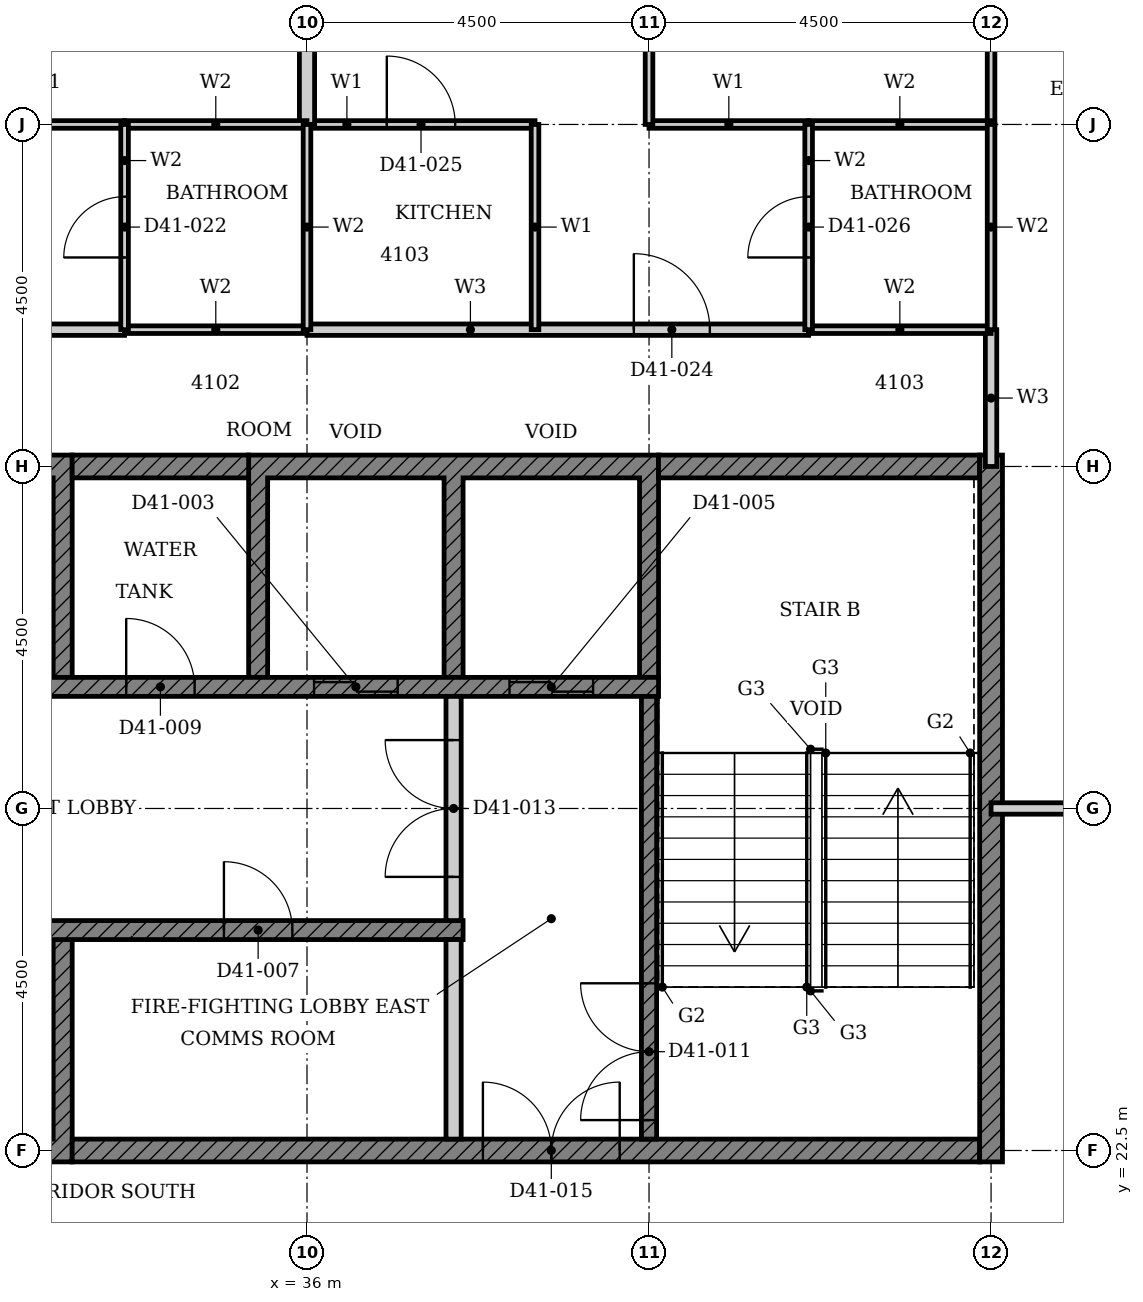
"""IFC4 building model, lengths in metres.
Left out: names, types, materials, properties, quantities, classifications, styles, units other than length and angle.
Written with IfcOpenShell. Run it as: python <this file> out.ifc"""

import sys

from ifc_helpers import new_model, si_unit, direction, frame, frame_2d, origin, place, context, subcontext, project, spatial, polyline, rectangle, outline, extrude, element, fill, save


model = new_model("IFC4")
c1 = context("Model", 3, precision=1e-05, world=origin(), true_north=direction((0.0, 1.0)))
c2 = subcontext(c1, "Body", "Model", "MODEL_VIEW")
j1 = project(units=[si_unit("LENGTHUNIT", "METRE"), si_unit("PLANEANGLEUNIT", "RADIAN")], contexts=[c1])
p1 = place(None, origin())
s1 = spatial("IfcSite", under=j1, at=p1, CompositionType="ELEMENT")
p2 = place(p1, origin())
s2 = spatial("IfcBuilding", under=s1, at=p2, CompositionType="ELEMENT")
p3 = place(p2, frame((0.0, 0.0, 165.4)))
s3 = spatial("IfcBuildingStorey", under=s2, at=p3, CompositionType="ELEMENT", Elevation=165.4)
p4 = place(p3, origin())
e1 = element("IfcWall", 1, at=p4, inside=s3, PredefinedType="SHEAR", context=c2, shape_type="SweptSolid", body=[
    extrude(outline(polyline([(27.518, 22.35), (32.911, 22.35), (32.911, 25.275), (32.661, 25.275), (32.661, 22.65), (30.339, 22.65), (30.339, 25.275), (30.089, 25.275), (30.089, 22.65), (27.768, 22.65), (27.768, 25.275), (27.518, 25.275), (27.518, 22.35)])), origin(), (0.0, 0.0, 1.0), 3.4),
])
p5 = place(p3, origin())
e2 = element("IfcWall", 2, at=p5, inside=s3, PredefinedType="SHEAR", context=c2, shape_type="SweptSolid", body=[
    extrude(outline(polyline([(27.518, 28.725), (27.768, 28.725), (27.768, 31.35), (30.089, 31.35), (30.089, 28.725), (30.339, 28.725), (30.339, 31.35), (32.661, 31.35), (32.661, 28.725), (32.911, 28.725), (32.911, 31.65), (27.518, 31.65), (27.518, 28.725)])), origin(), (0.0, 0.0, 1.0), 3.4),
])
p6 = place(p3, origin())
e3 = element("IfcWall", 3, at=p6, inside=s3, PredefinedType="SHEAR", context=c2, shape_type="SweptSolid", body=[
    extrude(outline(polyline([(35.232, 28.725), (35.482, 28.725), (35.482, 31.35), (37.803, 31.35), (37.803, 28.725), (38.053, 28.725), (38.053, 31.35), (40.375, 31.35), (40.375, 28.725), (40.625, 28.725), (40.625, 31.65), (35.232, 31.65), (35.232, 28.725)])), origin(), (0.0, 0.0, 1.0), 3.4),
])
p7 = place(p3, frame((32.911, 22.5, 0.0), z_axis=(0.0, 0.0, 1.0), x_axis=(1.0, 0.0, 0.0)))
e4 = element("IfcWall", 4, at=p7, inside=s3, PredefinedType="SHEAR", context=c2, shape_type="SweptSolid", body=[
    extrude(rectangle(XDim=11.939, YDim=0.3, at=frame_2d((5.97, 0.0))), origin(), (0.0, 0.0, 1.0), 3.4),
])
p8 = place(p7, frame((5.404, 0.0, 0.0)))
e5 = element("IfcOpeningElement", 5, at=p8, cuts=e4, PredefinedType="OPENING", context=c2, shape_type="SweptSolid", body=[
    extrude(rectangle(XDim=1.8, YDim=2.1, at=frame_2d((0.9, 1.05))), frame((0.0, 0.16, 0.0), z_axis=(0.0, -1.0, 0.0), x_axis=(1.0, 0.0, 0.0)), (0.0, 0.0, 1.0), 0.32),
])
p9 = place(p3, frame((32.911, 31.5, 0.0), z_axis=(0.0, 0.0, 1.0), x_axis=(1.0, 0.0, 0.0)))
e6 = element("IfcWall", 6, at=p9, inside=s3, PredefinedType="SHEAR", context=c2, shape_type="SweptSolid", body=[
    extrude(rectangle(XDim=2.322, YDim=0.3, at=frame_2d((1.161, 0.0))), origin(), (0.0, 0.0, 1.0), 3.4),
])
p10 = place(p3, frame((40.625, 31.5, 0.0), z_axis=(0.0, 0.0, 1.0), x_axis=(1.0, 0.0, 0.0)))
e7 = element("IfcWall", 7, at=p10, inside=s3, PredefinedType="SHEAR", context=c2, shape_type="SweptSolid", body=[
    extrude(rectangle(XDim=4.225, YDim=0.3, at=frame_2d((2.113, 0.0))), origin(), (0.0, 0.0, 1.0), 3.4),
])
p11 = place(p3, frame((45.0, 22.35, 0.0), z_axis=(0.0, 0.0, 1.0), x_axis=(0.0, 1.0, 0.0)))
e8 = element("IfcWall", 8, at=p11, inside=s3, PredefinedType="SHEAR", context=c2, shape_type="SweptSolid", body=[
    extrude(rectangle(XDim=9.3, YDim=0.3, at=frame_2d((4.65, 0.0))), origin(), (0.0, 0.0, 1.0), 3.4),
])
p12 = place(p3, frame((22.375, 25.4, 0.0), z_axis=(0.0, 0.0, 1.0), x_axis=(1.0, 0.0, 0.0)))
e9 = element("IfcWall", 9, at=p12, inside=s3, PredefinedType="SHEAR", context=c2, shape_type="SweptSolid", body=[
    extrude(rectangle(XDim=15.678, YDim=0.25, at=frame_2d((7.839, 0.0))), origin(), (0.0, 0.0, 1.0), 3.4),
])
p13 = place(p12, frame((8.575, 0.0, 0.0)))
e10 = element("IfcOpeningElement", 10, at=p13, cuts=e9, PredefinedType="OPENING", context=c2, shape_type="SweptSolid", body=[
    extrude(rectangle(XDim=1.1, YDim=2.1, at=frame_2d((0.55, 1.05))), frame((0.0, 0.135, 0.0), z_axis=(0.0, -1.0, 0.0), x_axis=(1.0, 0.0, 0.0)), (0.0, 0.0, 1.0), 0.27),
])
p14 = place(p12, frame((0.861, 0.0, 0.0)))
e11 = element("IfcOpeningElement", 11, at=p14, cuts=e9, PredefinedType="OPENING", context=c2, shape_type="SweptSolid", body=[
    extrude(rectangle(XDim=1.1, YDim=2.1, at=frame_2d((0.55, 1.05))), frame((0.0, 0.135, 0.0), z_axis=(0.0, -1.0, 0.0), x_axis=(1.0, 0.0, 0.0)), (0.0, 0.0, 1.0), 0.27),
])
p15 = place(p12, frame((3.532, 0.0, 0.0)))
e12 = element("IfcOpeningElement", 12, at=p15, cuts=e9, PredefinedType="OPENING", context=c2, shape_type="SweptSolid", body=[
    extrude(rectangle(XDim=0.9, YDim=2.1, at=frame_2d((0.45, 1.05))), frame((0.0, 0.135, 0.0), z_axis=(0.0, -1.0, 0.0), x_axis=(1.0, 0.0, 0.0)), (0.0, 0.0, 1.0), 0.27),
])
p16 = place(p12, frame((12.532, 0.0, 0.0)))
e13 = element("IfcOpeningElement", 13, at=p16, cuts=e9, PredefinedType="OPENING", context=c2, shape_type="SweptSolid", body=[
    extrude(rectangle(XDim=0.9, YDim=2.1, at=frame_2d((0.45, 1.05))), frame((0.0, 0.135, 0.0), z_axis=(0.0, -1.0, 0.0), x_axis=(1.0, 0.0, 0.0)), (0.0, 0.0, 1.0), 0.27),
])
p17 = place(p3, frame((24.947, 28.6, 0.0), z_axis=(0.0, 0.0, 1.0), x_axis=(1.0, 0.0, 0.0)))
e14 = element("IfcWall", 14, at=p17, inside=s3, PredefinedType="SHEAR", context=c2, shape_type="SweptSolid", body=[
    extrude(rectangle(XDim=15.678, YDim=0.25, at=frame_2d((7.839, 0.0))), origin(), (0.0, 0.0, 1.0), 3.4),
])
p18 = place(p17, frame((6.004, 0.0, 0.0)))
e15 = element("IfcOpeningElement", 15, at=p18, cuts=e14, PredefinedType="OPENING", context=c2, shape_type="SweptSolid", body=[
    extrude(rectangle(XDim=1.1, YDim=2.1, at=frame_2d((0.55, 1.05))), frame((0.0, 0.135, 0.0), z_axis=(0.0, -1.0, 0.0), x_axis=(1.0, 0.0, 0.0)), (0.0, 0.0, 1.0), 0.27),
])
p19 = place(p17, frame((11.146, 0.0, 0.0)))
e16 = element("IfcOpeningElement", 16, at=p19, cuts=e14, PredefinedType="OPENING", context=c2, shape_type="SweptSolid", body=[
    extrude(rectangle(XDim=1.1, YDim=2.1, at=frame_2d((0.55, 1.05))), frame((0.0, 0.135, 0.0), z_axis=(0.0, -1.0, 0.0), x_axis=(1.0, 0.0, 0.0)), (0.0, 0.0, 1.0), 0.27),
])
p20 = place(p17, frame((13.718, 0.0, 0.0)))
e17 = element("IfcOpeningElement", 17, at=p20, cuts=e14, PredefinedType="OPENING", context=c2, shape_type="SweptSolid", body=[
    extrude(rectangle(XDim=1.1, YDim=2.1, at=frame_2d((0.55, 1.05))), frame((0.0, 0.135, 0.0), z_axis=(0.0, -1.0, 0.0), x_axis=(1.0, 0.0, 0.0)), (0.0, 0.0, 1.0), 0.27),
])
p21 = place(p17, frame((0.961, 0.0, 0.0)))
e18 = element("IfcOpeningElement", 18, at=p21, cuts=e14, PredefinedType="OPENING", context=c2, shape_type="SweptSolid", body=[
    extrude(rectangle(XDim=0.9, YDim=2.1, at=frame_2d((0.45, 1.05))), frame((0.0, 0.135, 0.0), z_axis=(0.0, -1.0, 0.0), x_axis=(1.0, 0.0, 0.0)), (0.0, 0.0, 1.0), 0.27),
])
p22 = place(p17, frame((8.675, 0.0, 0.0)))
e19 = element("IfcOpeningElement", 19, at=p22, cuts=e14, PredefinedType="OPENING", context=c2, shape_type="SweptSolid", body=[
    extrude(rectangle(XDim=0.9, YDim=2.1, at=frame_2d((0.45, 1.05))), frame((0.0, 0.135, 0.0), z_axis=(0.0, -1.0, 0.0), x_axis=(1.0, 0.0, 0.0)), (0.0, 0.0, 1.0), 0.27),
])
p23 = place(p3, frame((37.928, 22.65, 0.0), z_axis=(0.0, 0.0, 1.0), x_axis=(0.0, 1.0, 0.0)))
e20 = element("IfcWall", 20, at=p23, inside=s3, PredefinedType="PARTITIONING", context=c2, shape_type="SweptSolid", body=[
    extrude(rectangle(XDim=2.625, YDim=0.2, at=frame_2d((1.312, 0.0))), origin(), (0.0, 0.0, 1.0), 3.4),
])
p24 = place(p3, frame((40.5, 22.65, 0.0), z_axis=(0.0, 0.0, 1.0), x_axis=(0.0, 1.0, 0.0)))
e21 = element("IfcWall", 21, at=p24, inside=s3, PredefinedType="SHEAR", context=c2, shape_type="SweptSolid", body=[
    extrude(rectangle(XDim=5.825, YDim=0.2, at=frame_2d((2.913, 0.0))), origin(), (0.0, 0.0, 1.0), 3.4),
])
p25 = place(p24, frame((0.25, 0.0, 0.0)))
e22 = element("IfcOpeningElement", 22, at=p25, cuts=e21, PredefinedType="OPENING", context=c2, shape_type="SweptSolid", body=[
    extrude(rectangle(XDim=1.8, YDim=2.1, at=frame_2d((0.9, 1.05))), frame((0.0, 0.11, 0.0), z_axis=(0.0, -1.0, 0.0), x_axis=(1.0, 0.0, 0.0)), (0.0, 0.0, 1.0), 0.22),
])
p26 = place(p3, frame((37.928, 25.525, 0.0), z_axis=(0.0, 0.0, 1.0), x_axis=(0.0, 1.0, 0.0)))
e23 = element("IfcWall", 23, at=p26, inside=s3, PredefinedType="PARTITIONING", context=c2, shape_type="SweptSolid", body=[
    extrude(rectangle(XDim=2.95, YDim=0.2, at=frame_2d((1.475, 0.0))), origin(), (0.0, 0.0, 1.0), 3.4),
])
p27 = place(p26, frame((0.575, 0.0, 0.0)))
e24 = element("IfcOpeningElement", 24, at=p27, cuts=e23, PredefinedType="OPENING", context=c2, shape_type="SweptSolid", body=[
    extrude(rectangle(XDim=1.8, YDim=2.1, at=frame_2d((0.9, 1.05))), frame((0.0, 0.11, 0.0), z_axis=(0.0, -1.0, 0.0), x_axis=(1.0, 0.0, 0.0)), (0.0, 0.0, 1.0), 0.22),
])
p28 = place(p3, frame((45.0, 27.0, 0.0), z_axis=(0.0, 0.0, 1.0), x_axis=(1.0, 0.0, 0.0)))
e25 = element("IfcWall", 25, at=p28, inside=s3, PredefinedType="PARTITIONING", context=c2, shape_type="SweptSolid", body=[
    extrude(rectangle(XDim=13.5, YDim=0.15, at=frame_2d((6.75, 0.0))), origin(), (0.0, 0.0, 1.0), 2.68),
])
p29 = place(p28, frame((7.15, 0.0, 0.0)))
e26 = element("IfcOpeningElement", 26, at=p29, cuts=e25, PredefinedType="OPENING", context=c2, shape_type="SweptSolid", body=[
    extrude(rectangle(XDim=1.0, YDim=2.1, at=frame_2d((0.5, 1.05))), frame((0.0, 0.085, 0.0), z_axis=(0.0, -1.0, 0.0), x_axis=(1.0, 0.0, 0.0)), (0.0, 0.0, 1.0), 0.17),
])
p30 = place(p3, frame((27.0, 33.3, 0.0), z_axis=(0.0, 0.0, 1.0), x_axis=(1.0, 0.0, 0.0)))
e27 = element("IfcWall", 27, at=p30, inside=s3, PredefinedType="PARTITIONING", context=c2, shape_type="SweptSolid", body=[
    extrude(rectangle(XDim=6.6, YDim=0.15, at=frame_2d((3.3, 0.0))), origin(), (0.0, 0.0, 1.0), 3.4),
])
p31 = place(p30, frame((4.3, 0.0, 0.0)))
e28 = element("IfcOpeningElement", 28, at=p31, cuts=e27, PredefinedType="OPENING", context=c2, shape_type="SweptSolid", body=[
    extrude(rectangle(XDim=1.0, YDim=2.2, at=frame_2d((0.5, 1.1))), frame((0.0, 0.085, 0.0), z_axis=(0.0, -1.0, 0.0), x_axis=(1.0, 0.0, 0.0)), (0.0, 0.0, 1.0), 0.17),
])
p32 = place(p3, frame((36.0, 33.3, 0.0), z_axis=(0.0, 0.0, 1.0), x_axis=(1.0, 0.0, 0.0)))
e29 = element("IfcWall", 29, at=p32, inside=s3, PredefinedType="PARTITIONING", context=c2, shape_type="SweptSolid", body=[
    extrude(rectangle(XDim=6.6, YDim=0.15, at=frame_2d((3.3, 0.0))), origin(), (0.0, 0.0, 1.0), 3.4),
])
p33 = place(p32, frame((4.3, 0.0, 0.0)))
e30 = element("IfcOpeningElement", 30, at=p33, cuts=e29, PredefinedType="OPENING", context=c2, shape_type="SweptSolid", body=[
    extrude(rectangle(XDim=1.0, YDim=2.2, at=frame_2d((0.5, 1.1))), frame((0.0, 0.085, 0.0), z_axis=(0.0, -1.0, 0.0), x_axis=(1.0, 0.0, 0.0)), (0.0, 0.0, 1.0), 0.17),
])
p34 = place(p3, frame((45.0, 31.5, 0.0), z_axis=(0.0, 0.0, 1.0), x_axis=(0.0, 1.0, 0.0)))
e31 = element("IfcWall", 31, at=p34, inside=s3, PredefinedType="PARTITIONING", context=c2, shape_type="SweptSolid", body=[
    extrude(rectangle(XDim=1.8, YDim=0.15, at=frame_2d((0.9, 0.0))), origin(), (0.0, 0.0, 1.0), 3.4),
])
for number, where, z_axis, x_axis in (
    (32, (31.5, 36.0, 0.0), (0.0, 0.0, 1.0), (1.0, 0.0, 0.0)),
    (33, (40.5, 36.0, 0.0), (0.0, 0.0, 1.0), (1.0, 0.0, 0.0)),
):
    element("IfcWall", number, at=place(p3, frame(where, z_axis=z_axis, x_axis=x_axis)), inside=s3, PredefinedType="PARTITIONING", context=c2, shape_type="SweptSolid", body=[
        extrude(rectangle(XDim=2.1, YDim=0.1, at=frame_2d((1.05, 0.0))), origin(), (0.0, 0.0, 1.0), 3.4),
    ])
p35 = place(p3, frame((36.0, 36.0, 0.0), z_axis=(0.0, 0.0, 1.0), x_axis=(1.0, 0.0, 0.0)))
e34 = element("IfcWall", 34, at=p35, inside=s3, PredefinedType="PARTITIONING", context=c2, shape_type="SweptSolid", body=[
    extrude(rectangle(XDim=3.0, YDim=0.1, at=frame_2d((1.5, 0.0))), origin(), (0.0, 0.0, 1.0), 3.4),
])
p36 = place(p35, frame((1.05, 0.0, 0.0)))
e35 = element("IfcOpeningElement", 35, at=p36, cuts=e34, PredefinedType="OPENING", context=c2, shape_type="SweptSolid", body=[
    extrude(rectangle(XDim=0.9, YDim=2.1, at=frame_2d((0.45, 1.05))), frame((0.0, 0.06, 0.0), z_axis=(0.0, -1.0, 0.0), x_axis=(1.0, 0.0, 0.0)), (0.0, 0.0, 1.0), 0.12),
])
p37 = place(p3, frame((39.0, 33.3, 0.0), z_axis=(0.0, 0.0, 1.0), x_axis=(0.0, 1.0, 0.0)))
e36 = element("IfcWall", 36, at=p37, inside=s3, PredefinedType="PARTITIONING", context=c2, shape_type="SweptSolid", body=[
    extrude(rectangle(XDim=2.7, YDim=0.1, at=frame_2d((1.35, 0.0))), origin(), (0.0, 0.0, 1.0), 3.4),
])
p38 = place(p3, frame((40.5, 36.0, 0.0), z_axis=(0.0, 0.0, 1.0), x_axis=(0.0, 1.0, 0.0)))
e37 = element("IfcWall", 37, at=p38, inside=s3, PredefinedType="PARTITIONING", context=c2, shape_type="SweptSolid", body=[
    extrude(rectangle(XDim=4.84, YDim=0.1, at=frame_2d((2.42, 0.0))), origin(), (0.0, 0.0, 1.0), 3.4),
])
p39 = place(p38, frame((1.8, 0.0, 0.0)))
e38 = element("IfcOpeningElement", 38, at=p39, cuts=e37, PredefinedType="OPENING", context=c2, shape_type="SweptSolid", body=[
    extrude(rectangle(XDim=0.9, YDim=2.1, at=frame_2d((0.45, 1.05))), frame((0.0, 0.06, 0.0), z_axis=(0.0, -1.0, 0.0), x_axis=(1.0, 0.0, 0.0)), (0.0, 0.0, 1.0), 0.12),
])
p40 = place(p3, frame((45.0, 36.001, 0.0), z_axis=(0.0, 0.0, 1.0), x_axis=(0.0, 1.0, 0.0)))
e39 = element("IfcWall", 39, at=p40, inside=s3, PredefinedType="PARTITIONING", context=c2, shape_type="SweptSolid", body=[
    extrude(rectangle(XDim=2.439, YDim=0.1, at=frame_2d((1.219, 0.0))), origin(), (0.0, 0.0, 1.0), 3.4),
])
p41 = place(p3, frame((36.0, 36.0, 0.0), z_axis=(0.0, 0.0, 1.0), x_axis=(0.0, 1.0, 0.0)))
e40 = element("IfcWall", 40, at=p41, inside=s3, PredefinedType="PARTITIONING", context=c2, shape_type="SweptSolid", body=[
    extrude(rectangle(XDim=4.69, YDim=0.2, at=frame_2d((2.345, 0.0))), origin(), (0.0, 0.0, 1.0), 3.4),
])
for number, where, z_axis, x_axis in (
    (41, (33.6, 33.3, 0.0), (0.0, 0.0, 1.0), (1.0, 0.0, 0.0)),
    (42, (42.6, 33.3, 0.0), (0.0, 0.0, 1.0), (1.0, 0.0, 0.0)),
    (43, (33.6, 36.0, 0.0), (0.0, 0.0, 1.0), (1.0, 0.0, 0.0)),
    (44, (42.6, 36.0, 0.0), (0.0, 0.0, 1.0), (1.0, 0.0, 0.0)),
):
    element("IfcWall", number, at=place(p3, frame(where, z_axis=z_axis, x_axis=x_axis)), inside=s3, PredefinedType="PARTITIONING", context=c2, shape_type="SweptSolid", body=[
        extrude(rectangle(XDim=2.4, YDim=0.1, at=frame_2d((1.2, 0.0))), origin(), (0.0, 0.0, 1.0), 3.4),
    ])
p42 = place(p3, frame((33.6, 33.3, 0.0), z_axis=(0.0, 0.0, 1.0), x_axis=(0.0, 1.0, 0.0)))
e45 = element("IfcWall", 45, at=p42, inside=s3, PredefinedType="PARTITIONING", context=c2, shape_type="SweptSolid", body=[
    extrude(rectangle(XDim=2.7, YDim=0.1, at=frame_2d((1.35, 0.0))), origin(), (0.0, 0.0, 1.0), 3.4),
])
p43 = place(p42, frame((0.95, 0.0, 0.0)))
e46 = element("IfcOpeningElement", 46, at=p43, cuts=e45, PredefinedType="OPENING", context=c2, shape_type="SweptSolid", body=[
    extrude(rectangle(XDim=0.8, YDim=2.1, at=frame_2d((0.4, 1.05))), frame((0.0, 0.06, 0.0), z_axis=(0.0, -1.0, 0.0), x_axis=(1.0, 0.0, 0.0)), (0.0, 0.0, 1.0), 0.12),
])
p44 = place(p3, frame((36.0, 33.3, 0.0), z_axis=(0.0, 0.0, 1.0), x_axis=(0.0, 1.0, 0.0)))
e47 = element("IfcWall", 47, at=p44, inside=s3, PredefinedType="PARTITIONING", context=c2, shape_type="SweptSolid", body=[
    extrude(rectangle(XDim=2.7, YDim=0.1, at=frame_2d((1.35, 0.0))), origin(), (0.0, 0.0, 1.0), 3.4),
])
p45 = place(p3, frame((42.6, 33.3, 0.0), z_axis=(0.0, 0.0, 1.0), x_axis=(0.0, 1.0, 0.0)))
e48 = element("IfcWall", 48, at=p45, inside=s3, PredefinedType="PARTITIONING", context=c2, shape_type="SweptSolid", body=[
    extrude(rectangle(XDim=2.7, YDim=0.1, at=frame_2d((1.35, 0.0))), origin(), (0.0, 0.0, 1.0), 3.4),
])
p46 = place(p45, frame((0.95, 0.0, 0.0)))
e49 = element("IfcOpeningElement", 49, at=p46, cuts=e48, PredefinedType="OPENING", context=c2, shape_type="SweptSolid", body=[
    extrude(rectangle(XDim=0.8, YDim=2.1, at=frame_2d((0.4, 1.05))), frame((0.0, 0.06, 0.0), z_axis=(0.0, -1.0, 0.0), x_axis=(1.0, 0.0, 0.0)), (0.0, 0.0, 1.0), 0.12),
])
p47 = place(p3, frame((45.0, 33.3, 0.0), z_axis=(0.0, 0.0, 1.0), x_axis=(0.0, 1.0, 0.0)))
e50 = element("IfcWall", 50, at=p47, inside=s3, PredefinedType="PARTITIONING", context=c2, shape_type="SweptSolid", body=[
    extrude(rectangle(XDim=2.7, YDim=0.1, at=frame_2d((1.35, 0.0))), origin(), (0.0, 0.0, 1.0), 3.4),
])
p48 = place(p19, origin())
e51 = element("IfcDoor", 51, at=p48, inside=s3, OperationType="DOUBLE_DOOR_SLIDING", PredefinedType="DOOR", context=c2, shape_type="SweptSolid", body=[
    extrude(rectangle(XDim=1.1, YDim=2.1, at=frame_2d((0.55, 1.05))), frame((0.0, 0.025, 0.0), z_axis=(0.0, -1.0, 0.0), x_axis=(1.0, 0.0, 0.0)), (0.0, 0.0, 1.0), 0.05),
])
fill(e16, e51)
p49 = place(p20, origin())
e52 = element("IfcDoor", 52, at=p49, inside=s3, OperationType="DOUBLE_DOOR_SLIDING", PredefinedType="DOOR", context=c2, shape_type="SweptSolid", body=[
    extrude(rectangle(XDim=1.1, YDim=2.1, at=frame_2d((0.55, 1.05))), frame((0.0, 0.025, 0.0), z_axis=(0.0, -1.0, 0.0), x_axis=(1.0, 0.0, 0.0)), (0.0, 0.0, 1.0), 0.05),
])
fill(e17, e52)
p50 = place(p16, origin())
e53 = element("IfcDoor", 53, at=p50, inside=s3, OperationType="SINGLE_SWING_LEFT", PredefinedType="DOOR", context=c2, shape_type="SweptSolid", body=[
    extrude(rectangle(XDim=0.9, YDim=2.1, at=frame_2d((0.45, 1.05))), frame((0.0, 0.025, 0.0), z_axis=(0.0, -1.0, 0.0), x_axis=(1.0, 0.0, 0.0)), (0.0, 0.0, 1.0), 0.05),
])
fill(e13, e53)
p51 = place(p22, origin())
e54 = element("IfcDoor", 54, at=p51, inside=s3, OperationType="SINGLE_SWING_LEFT", PredefinedType="DOOR", context=c2, shape_type="SweptSolid", body=[
    extrude(rectangle(XDim=0.9, YDim=2.1, at=frame_2d((0.45, 1.05))), frame((0.0, 0.025, 0.0), z_axis=(0.0, -1.0, 0.0), x_axis=(1.0, 0.0, 0.0)), (0.0, 0.0, 1.0), 0.05),
])
fill(e19, e54)
p52 = place(p25, origin())
e55 = element("IfcDoor", 55, at=p52, inside=s3, OperationType="DOUBLE_DOOR_SINGLE_SWING", PredefinedType="DOOR", context=c2, shape_type="SweptSolid", body=[
    extrude(rectangle(XDim=1.8, YDim=2.1, at=frame_2d((0.9, 1.05))), frame((0.0, 0.025, 0.0), z_axis=(0.0, -1.0, 0.0), x_axis=(1.0, 0.0, 0.0)), (0.0, 0.0, 1.0), 0.05),
])
fill(e22, e55)
p53 = place(p27, origin())
e56 = element("IfcDoor", 56, at=p53, inside=s3, OperationType="DOUBLE_DOOR_SINGLE_SWING", PredefinedType="DOOR", context=c2, shape_type="SweptSolid", body=[
    extrude(rectangle(XDim=1.8, YDim=2.1, at=frame_2d((0.9, 1.05))), frame((0.0, 0.025, 0.0), z_axis=(0.0, -1.0, 0.0), x_axis=(1.0, 0.0, 0.0)), (0.0, 0.0, 1.0), 0.05),
])
fill(e24, e56)
p54 = place(p8, origin())
e57 = element("IfcDoor", 57, at=p54, inside=s3, OperationType="DOUBLE_DOOR_SINGLE_SWING", PredefinedType="DOOR", context=c2, shape_type="SweptSolid", body=[
    extrude(rectangle(XDim=1.8, YDim=2.1, at=frame_2d((0.9, 1.05))), frame((0.0, 0.025, 0.0), z_axis=(0.0, -1.0, 0.0), x_axis=(1.0, 0.0, 0.0)), (0.0, 0.0, 1.0), 0.05),
])
fill(e5, e57)
p55 = place(p43, origin())
e58 = element("IfcDoor", 58, at=p55, inside=s3, OperationType="SINGLE_SWING_LEFT", PredefinedType="DOOR", context=c2, shape_type="SweptSolid", body=[
    extrude(rectangle(XDim=0.8, YDim=2.1, at=frame_2d((0.4, 1.05))), frame((0.0, 0.025, 0.0), z_axis=(0.0, -1.0, 0.0), x_axis=(1.0, 0.0, 0.0)), (0.0, 0.0, 1.0), 0.05),
])
fill(e46, e58)
p56 = place(p33, origin())
e59 = element("IfcDoor", 59, at=p56, inside=s3, OperationType="SINGLE_SWING_RIGHT", PredefinedType="DOOR", context=c2, shape_type="SweptSolid", body=[
    extrude(rectangle(XDim=1.0, YDim=2.2, at=frame_2d((0.5, 1.1))), frame((0.0, 0.025, 0.0), z_axis=(0.0, -1.0, 0.0), x_axis=(1.0, 0.0, 0.0)), (0.0, 0.0, 1.0), 0.05),
])
fill(e30, e59)
p57 = place(p36, origin())
e60 = element("IfcDoor", 60, at=p57, inside=s3, OperationType="SINGLE_SWING_LEFT", PredefinedType="DOOR", context=c2, shape_type="SweptSolid", body=[
    extrude(rectangle(XDim=0.9, YDim=2.1, at=frame_2d((0.45, 1.05))), frame((0.0, 0.025, 0.0), z_axis=(0.0, -1.0, 0.0), x_axis=(1.0, 0.0, 0.0)), (0.0, 0.0, 1.0), 0.05),
])
fill(e35, e60)
p58 = place(p46, origin())
e61 = element("IfcDoor", 61, at=p58, inside=s3, OperationType="SINGLE_SWING_RIGHT", PredefinedType="DOOR", context=c2, shape_type="SweptSolid", body=[
    extrude(rectangle(XDim=0.8, YDim=2.1, at=frame_2d((0.4, 1.05))), frame((0.0, 0.025, 0.0), z_axis=(0.0, -1.0, 0.0), x_axis=(1.0, 0.0, 0.0)), (0.0, 0.0, 1.0), 0.05),
])
fill(e49, e61)
save(model, sys.argv[1])
